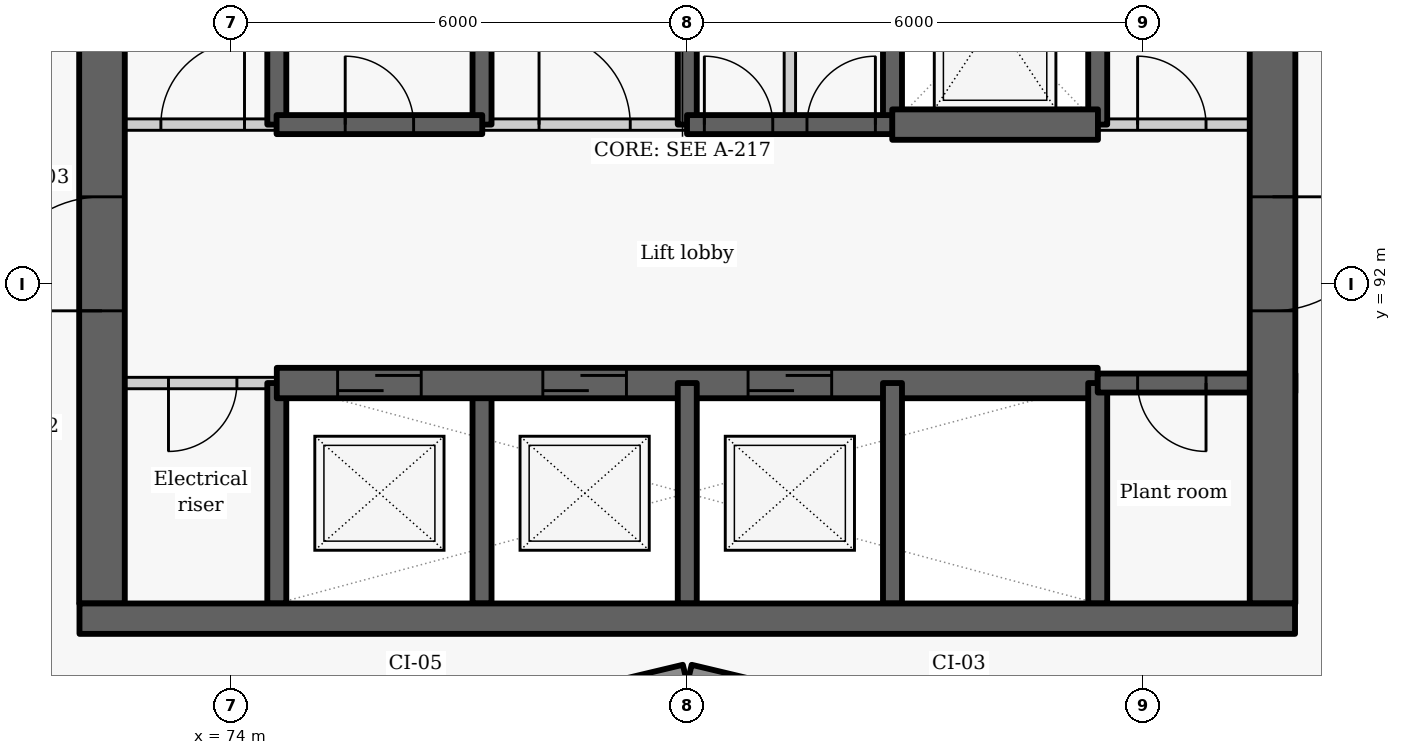
"""IFC4 building model, lengths in metres.
Left out: names, types, materials, properties, quantities, classifications, styles, units other than length and angle.
Written with IfcOpenShell. Run it as: python <this file> out.ifc"""

import sys

from ifc_helpers import new_model, si_unit, direction, frame, frame_2d, origin, place, context, subcontext, project, spatial, rectangle, extrude, element, fill, save


model = new_model("IFC4")
c1 = context("Model", 3, precision=1e-05, world=origin(), true_north=direction((0.0, 1.0)))
c2 = subcontext(c1, "Body", "Model", "MODEL_VIEW")
j1 = project(units=[si_unit("LENGTHUNIT", "METRE"), si_unit("PLANEANGLEUNIT", "RADIAN")], contexts=[c1])
p1 = place(None, origin())
s1 = spatial("IfcSite", under=j1, at=p1, CompositionType="ELEMENT")
p2 = place(p1, origin())
s2 = spatial("IfcBuilding", under=s1, at=p2, CompositionType="ELEMENT")
p3 = place(p2, frame((0.0, 0.0, 81.0)))
s3 = spatial("IfcBuildingStorey", under=s2, at=p3, CompositionType="ELEMENT", Elevation=81.0)
for number, where, z_axis, x_axis in (
    (1, (76.814, 86.119, 0.0), (0.0, 0.0, 1.0), (0.973, 0.232, 0.0)),
    (2, (80.029, 86.872, 0.0), (0.0, 0.0, 1.0), (0.973, -0.232, 0.0)),
):
    element("IfcWall", number, at=place(p3, frame(where, z_axis=z_axis, x_axis=x_axis)), inside=s3, PredefinedType="SOLIDWALL", context=c2, shape_type="SweptSolid", body=[
        extrude(rectangle(XDim=3.246, YDim=0.25, at=frame_2d((1.623, 0.0))), origin(), (0.0, 0.0, 1.0), 2.425),
    ])
p4 = place(p3, frame((74.6, 87.8, -0.275), z_axis=(0.0, 0.0, 1.0), x_axis=(0.0, 1.0, 0.0)))
e3 = element("IfcWall", 3, at=p4, inside=s3, PredefinedType="SHEAR", context=c2, shape_type="SweptSolid", body=[
    extrude(rectangle(XDim=2.9, YDim=0.25, at=frame_2d((1.45, 0.0))), origin(), (0.0, 0.0, 1.0), 3.3),
])
p5 = place(p3, frame((74.6, 94.1, -0.275), z_axis=(0.0, 0.0, 1.0), x_axis=(0.0, 1.0, 0.0)))
e4 = element("IfcWall", 4, at=p5, inside=s3, PredefinedType="SHEAR", context=c2, shape_type="SweptSolid", body=[
    extrude(rectangle(XDim=2.8, YDim=0.25, at=frame_2d((1.4, 0.0))), origin(), (0.0, 0.0, 1.0), 3.3),
])
p6 = place(p3, frame((74.6, 90.7, 0.0), z_axis=(0.0, 0.0, 1.0), x_axis=(-1.0, 0.0, 0.0)))
e5 = element("IfcWall", 5, at=p6, inside=s3, PredefinedType="PARTITIONING", context=c2, shape_type="SweptSolid", body=[
    extrude(rectangle(XDim=2.6, YDim=0.15, at=frame_2d((1.3, 0.0))), origin(), (0.0, 0.0, 1.0), 3.025),
])
p7 = place(p6, frame((0.525, 0.0, 0.0)))
e6 = element("IfcOpeningElement", 6, at=p7, cuts=e5, PredefinedType="OPENING", context=c2, shape_type="SweptSolid", body=[
    extrude(rectangle(XDim=0.9, YDim=2.1, at=frame_2d((0.45, 1.05))), frame((0.0, 0.085, 0.0), z_axis=(0.0, -1.0, 0.0), x_axis=(1.0, 0.0, 0.0)), (0.0, 0.0, 1.0), 0.17),
])
p8 = place(p3, frame((72.3, 87.8, -0.275), z_axis=(0.0, 0.0, 1.0), x_axis=(0.0, 1.0, 0.0)))
e7 = element("IfcWall", 7, at=p8, inside=s3, PredefinedType="SHEAR", context=c2, shape_type="SweptSolid", body=[
    extrude(rectangle(XDim=9.1, YDim=0.6, at=frame_2d((4.55, 0.0))), origin(), (0.0, 0.0, 1.0), 3.3),
])
p9 = place(p8, frame((3.85, 0.0, 0.275)))
e8 = element("IfcOpeningElement", 8, at=p9, cuts=e7, PredefinedType="OPENING", context=c2, shape_type="SweptSolid", body=[
    extrude(rectangle(XDim=1.5, YDim=2.1, at=frame_2d((0.75, 1.05))), frame((0.0, 0.31, 0.0), z_axis=(0.0, -1.0, 0.0), x_axis=(1.0, 0.0, 0.0)), (0.0, 0.0, 1.0), 0.62),
])
p10 = place(p3, frame((77.3, 87.8, -0.275), z_axis=(0.0, 0.0, 1.0), x_axis=(0.0, 1.0, 0.0)))
e9 = element("IfcWall", 9, at=p10, inside=s3, PredefinedType="SHEAR", context=c2, shape_type="SweptSolid", body=[
    extrude(rectangle(XDim=2.9, YDim=0.25, at=frame_2d((1.45, 0.0))), origin(), (0.0, 0.0, 1.0), 3.3),
])
p11 = place(p3, frame((77.3, 94.1, -0.275), z_axis=(0.0, 0.0, 1.0), x_axis=(0.0, 1.0, 0.0)))
e10 = element("IfcWall", 10, at=p11, inside=s3, PredefinedType="SHEAR", context=c2, shape_type="SweptSolid", body=[
    extrude(rectangle(XDim=2.8, YDim=0.25, at=frame_2d((1.4, 0.0))), origin(), (0.0, 0.0, 1.0), 3.3),
])
p12 = place(p3, frame((74.6, 90.7, -0.275), z_axis=(0.0, 0.0, 1.0), x_axis=(1.0, 0.0, 0.0)))
e11 = element("IfcWall", 11, at=p12, inside=s3, PredefinedType="SHEAR", context=c2, shape_type="SweptSolid", body=[
    extrude(rectangle(XDim=10.8, YDim=0.4, at=frame_2d((5.4, 0.0))), origin(), (0.0, 0.0, 1.0), 3.3),
])
p13 = place(p12, frame((0.8, 0.0, 0.275)))
e12 = element("IfcOpeningElement", 12, at=p13, cuts=e11, PredefinedType="OPENING", context=c2, shape_type="SweptSolid", body=[
    extrude(rectangle(XDim=1.1, YDim=2.1, at=frame_2d((0.55, 1.05))), frame((0.0, 0.21, 0.0), z_axis=(0.0, -1.0, 0.0), x_axis=(1.0, 0.0, 0.0)), (0.0, 0.0, 1.0), 0.42),
])
p14 = place(p12, frame((3.5, 0.0, 0.275)))
e13 = element("IfcOpeningElement", 13, at=p14, cuts=e11, PredefinedType="OPENING", context=c2, shape_type="SweptSolid", body=[
    extrude(rectangle(XDim=1.1, YDim=2.1, at=frame_2d((0.55, 1.05))), frame((0.0, 0.21, 0.0), z_axis=(0.0, -1.0, 0.0), x_axis=(1.0, 0.0, 0.0)), (0.0, 0.0, 1.0), 0.42),
])
p15 = place(p12, frame((6.2, 0.0, 0.275)))
e14 = element("IfcOpeningElement", 14, at=p15, cuts=e11, PredefinedType="OPENING", context=c2, shape_type="SweptSolid", body=[
    extrude(rectangle(XDim=1.1, YDim=2.1, at=frame_2d((0.55, 1.05))), frame((0.0, 0.21, 0.0), z_axis=(0.0, -1.0, 0.0), x_axis=(1.0, 0.0, 0.0)), (0.0, 0.0, 1.0), 0.42),
])
p16 = place(p3, frame((80.0, 87.8, -0.275), z_axis=(0.0, 0.0, 1.0), x_axis=(0.0, 1.0, 0.0)))
e15 = element("IfcWall", 15, at=p16, inside=s3, PredefinedType="SHEAR", context=c2, shape_type="SweptSolid", body=[
    extrude(rectangle(XDim=2.9, YDim=0.25, at=frame_2d((1.45, 0.0))), origin(), (0.0, 0.0, 1.0), 3.3),
])
p17 = place(p3, frame((80.0, 94.1, -0.275), z_axis=(0.0, 0.0, 1.0), x_axis=(0.0, 1.0, 0.0)))
e16 = element("IfcWall", 16, at=p17, inside=s3, PredefinedType="SHEAR", context=c2, shape_type="SweptSolid", body=[
    extrude(rectangle(XDim=2.8, YDim=0.25, at=frame_2d((1.4, 0.0))), origin(), (0.0, 0.0, 1.0), 3.3),
])
p18 = place(p3, frame((82.7, 87.8, -0.275), z_axis=(0.0, 0.0, 1.0), x_axis=(0.0, 1.0, 0.0)))
e17 = element("IfcWall", 17, at=p18, inside=s3, PredefinedType="SHEAR", context=c2, shape_type="SweptSolid", body=[
    extrude(rectangle(XDim=2.9, YDim=0.25, at=frame_2d((1.45, 0.0))), origin(), (0.0, 0.0, 1.0), 3.3),
])
p19 = place(p3, frame((82.7, 94.1, -0.275), z_axis=(0.0, 0.0, 1.0), x_axis=(0.0, 1.0, 0.0)))
e18 = element("IfcWall", 18, at=p19, inside=s3, PredefinedType="SHEAR", context=c2, shape_type="SweptSolid", body=[
    extrude(rectangle(XDim=2.8, YDim=0.25, at=frame_2d((1.4, 0.0))), origin(), (0.0, 0.0, 1.0), 3.3),
])
p20 = place(p3, frame((85.4, 87.8, -0.275), z_axis=(0.0, 0.0, 1.0), x_axis=(0.0, 1.0, 0.0)))
e19 = element("IfcWall", 19, at=p20, inside=s3, PredefinedType="SHEAR", context=c2, shape_type="SweptSolid", body=[
    extrude(rectangle(XDim=2.9, YDim=0.25, at=frame_2d((1.45, 0.0))), origin(), (0.0, 0.0, 1.0), 3.3),
])
p21 = place(p3, frame((85.4, 94.1, -0.275), z_axis=(0.0, 0.0, 1.0), x_axis=(0.0, 1.0, 0.0)))
e20 = element("IfcWall", 20, at=p21, inside=s3, PredefinedType="SHEAR", context=c2, shape_type="SweptSolid", body=[
    extrude(rectangle(XDim=2.8, YDim=0.25, at=frame_2d((1.4, 0.0))), origin(), (0.0, 0.0, 1.0), 3.3),
])
p22 = place(p3, frame((88.0, 90.7, -0.275), z_axis=(0.0, 0.0, 1.0), x_axis=(-1.0, 0.0, 0.0)))
e21 = element("IfcWall", 21, at=p22, inside=s3, PredefinedType="SHEAR", context=c2, shape_type="SweptSolid", body=[
    extrude(rectangle(XDim=2.6, YDim=0.25, at=frame_2d((1.3, 0.0))), origin(), (0.0, 0.0, 1.0), 3.3),
])
p23 = place(p22, frame((1.175, 0.0, 0.275)))
e22 = element("IfcOpeningElement", 22, at=p23, cuts=e21, PredefinedType="OPENING", context=c2, shape_type="SweptSolid", body=[
    extrude(rectangle(XDim=0.9, YDim=2.1, at=frame_2d((0.45, 1.05))), frame((0.0, 0.135, 0.0), z_axis=(0.0, -1.0, 0.0), x_axis=(1.0, 0.0, 0.0)), (0.0, 0.0, 1.0), 0.27),
])
p24 = place(p3, frame((87.7, 103.4, -0.275), z_axis=(0.0, 0.0, 1.0), x_axis=(0.0, -1.0, 0.0)))
e23 = element("IfcWall", 23, at=p24, inside=s3, PredefinedType="SHEAR", context=c2, shape_type="SweptSolid", body=[
    extrude(rectangle(XDim=15.6, YDim=0.6, at=frame_2d((7.8, 0.0))), origin(), (0.0, 0.0, 1.0), 3.3),
])
p25 = place(p24, frame((10.25, 0.0, 0.275)))
e24 = element("IfcOpeningElement", 24, at=p25, cuts=e23, PredefinedType="OPENING", context=c2, shape_type="SweptSolid", body=[
    extrude(rectangle(XDim=1.5, YDim=2.1, at=frame_2d((0.75, 1.05))), frame((0.0, 0.31, 0.0), z_axis=(0.0, -1.0, 0.0), x_axis=(1.0, 0.0, 0.0)), (0.0, 0.0, 1.0), 0.62),
])
p26 = place(p24, frame((2.7, 0.0, 0.275)))
e25 = element("IfcOpeningElement", 25, at=p26, cuts=e23, PredefinedType="OPENING", context=c2, shape_type="SweptSolid", body=[
    extrude(rectangle(XDim=1.1, YDim=2.1, at=frame_2d((0.55, 1.05))), frame((0.0, 0.31, 0.0), z_axis=(0.0, -1.0, 0.0), x_axis=(1.0, 0.0, 0.0)), (0.0, 0.0, 1.0), 0.62),
])
p27 = place(p3, frame((72.0, 94.1, 0.0), z_axis=(0.0, 0.0, 1.0), x_axis=(1.0, 0.0, 0.0)))
e26 = element("IfcWall", 26, at=p27, inside=s3, PredefinedType="PARTITIONING", context=c2, shape_type="SweptSolid", body=[
    extrude(rectangle(XDim=2.603, YDim=0.15, at=frame_2d((1.302, 0.0))), origin(), (0.0, 0.0, 1.0), 3.025),
])
p28 = place(p27, frame((1.075, 0.0, 0.0)))
e27 = element("IfcOpeningElement", 27, at=p28, cuts=e26, PredefinedType="OPENING", context=c2, shape_type="SweptSolid", body=[
    extrude(rectangle(XDim=1.1, YDim=2.1, at=frame_2d((0.55, 1.05))), frame((0.0, 0.085, 0.0), z_axis=(0.0, -1.0, 0.0), x_axis=(1.0, 0.0, 0.0)), (0.0, 0.0, 1.0), 0.17),
])
p29 = place(p3, frame((77.297, 94.1, 0.0), z_axis=(0.0, 0.0, 1.0), x_axis=(1.0, 0.0, 0.0)))
e28 = element("IfcWall", 28, at=p29, inside=s3, PredefinedType="PARTITIONING", context=c2, shape_type="SweptSolid", body=[
    extrude(rectangle(XDim=2.706, YDim=0.15, at=frame_2d((1.353, 0.0))), origin(), (0.0, 0.0, 1.0), 3.025),
])
p30 = place(p29, frame((0.753, 0.0, 0.0)))
e29 = element("IfcOpeningElement", 29, at=p30, cuts=e28, PredefinedType="OPENING", context=c2, shape_type="SweptSolid", body=[
    extrude(rectangle(XDim=1.2, YDim=2.1, at=frame_2d((0.6, 1.05))), frame((0.0, 0.085, 0.0), z_axis=(0.0, -1.0, 0.0), x_axis=(1.0, 0.0, 0.0)), (0.0, 0.0, 1.0), 0.17),
])
p31 = place(p3, frame((85.397, 94.1, 0.0), z_axis=(0.0, 0.0, 1.0), x_axis=(1.0, 0.0, 0.0)))
e30 = element("IfcWall", 30, at=p31, inside=s3, PredefinedType="PARTITIONING", context=c2, shape_type="SweptSolid", body=[
    extrude(rectangle(XDim=2.603, YDim=0.15, at=frame_2d((1.302, 0.0))), origin(), (0.0, 0.0, 1.0), 3.025),
])
p32 = place(p31, frame((0.528, 0.0, 0.0)))
e31 = element("IfcOpeningElement", 31, at=p32, cuts=e30, PredefinedType="OPENING", context=c2, shape_type="SweptSolid", body=[
    extrude(rectangle(XDim=0.9, YDim=2.1, at=frame_2d((0.45, 1.05))), frame((0.0, 0.085, 0.0), z_axis=(0.0, -1.0, 0.0), x_axis=(1.0, 0.0, 0.0)), (0.0, 0.0, 1.0), 0.17),
])
p33 = place(p3, frame((74.597, 94.1, -0.275), z_axis=(0.0, 0.0, 1.0), x_axis=(1.0, 0.0, 0.0)))
e32 = element("IfcWall", 32, at=p33, inside=s3, PredefinedType="SHEAR", context=c2, shape_type="SweptSolid", body=[
    extrude(rectangle(XDim=2.706, YDim=0.25, at=frame_2d((1.353, 0.0))), origin(), (0.0, 0.0, 1.0), 3.3),
])
p34 = place(p33, frame((0.903, 0.0, 0.275)))
e33 = element("IfcOpeningElement", 33, at=p34, cuts=e32, PredefinedType="OPENING", context=c2, shape_type="SweptSolid", body=[
    extrude(rectangle(XDim=0.9, YDim=2.1, at=frame_2d((0.45, 1.05))), frame((0.0, 0.135, 0.0), z_axis=(0.0, -1.0, 0.0), x_axis=(1.0, 0.0, 0.0)), (0.0, 0.0, 1.0), 0.27),
])
p35 = place(p3, frame((79.997, 94.1, -0.275), z_axis=(0.0, 0.0, 1.0), x_axis=(1.0, 0.0, 0.0)))
e34 = element("IfcWall", 34, at=p35, inside=s3, PredefinedType="SHEAR", context=c2, shape_type="SweptSolid", body=[
    extrude(rectangle(XDim=2.706, YDim=0.25, at=frame_2d((1.353, 0.0))), origin(), (0.0, 0.0, 1.0), 3.3),
])
p36 = place(p35, frame((0.228, 0.0, 0.275)))
e35 = element("IfcOpeningElement", 35, at=p36, cuts=e34, PredefinedType="OPENING", context=c2, shape_type="SweptSolid", body=[
    extrude(rectangle(XDim=0.9, YDim=2.1, at=frame_2d((0.45, 1.05))), frame((0.0, 0.135, 0.0), z_axis=(0.0, -1.0, 0.0), x_axis=(1.0, 0.0, 0.0)), (0.0, 0.0, 1.0), 0.27),
])
p37 = place(p35, frame((1.578, 0.0, 0.275)))
e36 = element("IfcOpeningElement", 36, at=p37, cuts=e34, PredefinedType="OPENING", context=c2, shape_type="SweptSolid", body=[
    extrude(rectangle(XDim=0.9, YDim=2.1, at=frame_2d((0.45, 1.05))), frame((0.0, 0.135, 0.0), z_axis=(0.0, -1.0, 0.0), x_axis=(1.0, 0.0, 0.0)), (0.0, 0.0, 1.0), 0.27),
])
p38 = place(p3, frame((82.697, 94.1, -0.275), z_axis=(0.0, 0.0, 1.0), x_axis=(1.0, 0.0, 0.0)))
e37 = element("IfcWall", 37, at=p38, inside=s3, PredefinedType="SHEAR", context=c2, shape_type="SweptSolid", body=[
    extrude(rectangle(XDim=2.706, YDim=0.4, at=frame_2d((1.353, 0.0))), origin(), (0.0, 0.0, 1.0), 3.3),
])
p39 = place(p3, frame((81.35, 94.1, 0.0), z_axis=(0.0, 0.0, 1.0), x_axis=(0.0, 1.0, 0.0)))
e38 = element("IfcWall", 38, at=p39, inside=s3, PredefinedType="PARTITIONING", context=c2, shape_type="SweptSolid", body=[
    extrude(rectangle(XDim=2.8, YDim=0.15, at=frame_2d((1.4, 0.0))), origin(), (0.0, 0.0, 1.0), 3.025),
])
p40 = place(p3, frame((72.004, 87.6, -0.275), z_axis=(0.0, 0.0, 1.0), x_axis=(1.0, 0.0, 0.0)))
e39 = element("IfcWall", 39, at=p40, inside=s3, PredefinedType="SHEAR", context=c2, shape_type="SweptSolid", body=[
    extrude(rectangle(XDim=15.992, YDim=0.4, at=frame_2d((7.996, 0.0))), origin(), (0.0, 0.0, 1.0), 3.3),
])
p41 = place(p7, origin())
e40 = element("IfcDoor", 40, at=p41, inside=s3, OperationType="SINGLE_SWING_RIGHT", PredefinedType="DOOR", context=c2, shape_type="SweptSolid", body=[
    extrude(rectangle(XDim=0.9, YDim=2.1, at=frame_2d((0.45, 1.05))), frame((0.0, 0.025, 0.0), z_axis=(0.0, -1.0, 0.0), x_axis=(1.0, 0.0, 0.0)), (0.0, 0.0, 1.0), 0.05),
])
fill(e6, e40)
p42 = place(p13, origin())
e41 = element("IfcDoor", 41, at=p42, inside=s3, OperationType="SLIDING_TO_LEFT", PredefinedType="DOOR", context=c2, shape_type="SweptSolid", body=[
    extrude(rectangle(XDim=1.1, YDim=2.1, at=frame_2d((0.55, 1.05))), frame((0.0, 0.025, 0.0), z_axis=(0.0, -1.0, 0.0), x_axis=(1.0, 0.0, 0.0)), (0.0, 0.0, 1.0), 0.05),
])
fill(e12, e41)
p43 = place(p14, origin())
e42 = element("IfcDoor", 42, at=p43, inside=s3, OperationType="SLIDING_TO_LEFT", PredefinedType="DOOR", context=c2, shape_type="SweptSolid", body=[
    extrude(rectangle(XDim=1.1, YDim=2.1, at=frame_2d((0.55, 1.05))), frame((0.0, 0.025, 0.0), z_axis=(0.0, -1.0, 0.0), x_axis=(1.0, 0.0, 0.0)), (0.0, 0.0, 1.0), 0.05),
])
fill(e13, e42)
p44 = place(p15, origin())
e43 = element("IfcDoor", 43, at=p44, inside=s3, OperationType="SLIDING_TO_LEFT", PredefinedType="DOOR", context=c2, shape_type="SweptSolid", body=[
    extrude(rectangle(XDim=1.1, YDim=2.1, at=frame_2d((0.55, 1.05))), frame((0.0, 0.025, 0.0), z_axis=(0.0, -1.0, 0.0), x_axis=(1.0, 0.0, 0.0)), (0.0, 0.0, 1.0), 0.05),
])
fill(e14, e43)
p45 = place(p23, origin())
e44 = element("IfcDoor", 44, at=p45, inside=s3, OperationType="SINGLE_SWING_LEFT", PredefinedType="DOOR", context=c2, shape_type="SweptSolid", body=[
    extrude(rectangle(XDim=0.9, YDim=2.1, at=frame_2d((0.45, 1.05))), frame((0.0, 0.025, 0.0), z_axis=(0.0, -1.0, 0.0), x_axis=(1.0, 0.0, 0.0)), (0.0, 0.0, 1.0), 0.05),
])
fill(e22, e44)
p46 = place(p28, origin())
e45 = element("IfcDoor", 45, at=p46, inside=s3, OperationType="SINGLE_SWING_RIGHT", PredefinedType="DOOR", context=c2, shape_type="SweptSolid", body=[
    extrude(rectangle(XDim=1.1, YDim=2.1, at=frame_2d((0.55, 1.05))), frame((0.0, 0.025, 0.0), z_axis=(0.0, -1.0, 0.0), x_axis=(1.0, 0.0, 0.0)), (0.0, 0.0, 1.0), 0.05),
])
fill(e27, e45)
p47 = place(p34, origin())
e46 = element("IfcDoor", 46, at=p47, inside=s3, OperationType="SINGLE_SWING_LEFT", PredefinedType="DOOR", context=c2, shape_type="SweptSolid", body=[
    extrude(rectangle(XDim=0.9, YDim=2.1, at=frame_2d((0.45, 1.05))), frame((0.0, 0.025, 0.0), z_axis=(0.0, -1.0, 0.0), x_axis=(1.0, 0.0, 0.0)), (0.0, 0.0, 1.0), 0.05),
])
fill(e33, e46)
p48 = place(p30, origin())
e47 = element("IfcDoor", 47, at=p48, inside=s3, OperationType="DOUBLE_DOOR_SINGLE_SWING", PredefinedType="DOOR", context=c2, shape_type="SweptSolid", body=[
    extrude(rectangle(XDim=1.2, YDim=2.1, at=frame_2d((0.6, 1.05))), frame((0.0, 0.025, 0.0), z_axis=(0.0, -1.0, 0.0), x_axis=(1.0, 0.0, 0.0)), (0.0, 0.0, 1.0), 0.05),
])
fill(e29, e47)
p49 = place(p36, origin())
e48 = element("IfcDoor", 48, at=p49, inside=s3, OperationType="SINGLE_SWING_LEFT", PredefinedType="DOOR", context=c2, shape_type="SweptSolid", body=[
    extrude(rectangle(XDim=0.9, YDim=2.1, at=frame_2d((0.45, 1.05))), frame((0.0, 0.025, 0.0), z_axis=(0.0, -1.0, 0.0), x_axis=(1.0, 0.0, 0.0)), (0.0, 0.0, 1.0), 0.05),
])
fill(e35, e48)
p50 = place(p37, origin())
e49 = element("IfcDoor", 49, at=p50, inside=s3, OperationType="SINGLE_SWING_RIGHT", PredefinedType="DOOR", context=c2, shape_type="SweptSolid", body=[
    extrude(rectangle(XDim=0.9, YDim=2.1, at=frame_2d((0.45, 1.05))), frame((0.0, 0.025, 0.0), z_axis=(0.0, -1.0, 0.0), x_axis=(1.0, 0.0, 0.0)), (0.0, 0.0, 1.0), 0.05),
])
fill(e36, e49)
p51 = place(p32, origin())
e50 = element("IfcDoor", 50, at=p51, inside=s3, OperationType="SINGLE_SWING_LEFT", PredefinedType="DOOR", context=c2, shape_type="SweptSolid", body=[
    extrude(rectangle(XDim=0.9, YDim=2.1, at=frame_2d((0.45, 1.05))), frame((0.0, 0.025, 0.0), z_axis=(0.0, -1.0, 0.0), x_axis=(1.0, 0.0, 0.0)), (0.0, 0.0, 1.0), 0.05),
])
fill(e31, e50)
p52 = place(p25, origin())
e51 = element("IfcDoor", 51, at=p52, inside=s3, OperationType="DOUBLE_DOOR_SINGLE_SWING", PredefinedType="DOOR", context=c2, shape_type="SweptSolid", body=[
    extrude(rectangle(XDim=1.5, YDim=2.1, at=frame_2d((0.75, 1.05))), frame((0.0, 0.025, 0.0), z_axis=(0.0, -1.0, 0.0), x_axis=(1.0, 0.0, 0.0)), (0.0, 0.0, 1.0), 0.05),
])
fill(e24, e51)
p53 = place(p9, origin())
e52 = element("IfcDoor", 52, at=p53, inside=s3, OperationType="DOUBLE_DOOR_SINGLE_SWING", PredefinedType="DOOR", context=c2, shape_type="SweptSolid", body=[
    extrude(rectangle(XDim=1.5, YDim=2.1, at=frame_2d((0.75, 1.05))), frame((0.0, 0.025, 0.0), z_axis=(0.0, -1.0, 0.0), x_axis=(1.0, 0.0, 0.0)), (0.0, 0.0, 1.0), 0.05),
])
fill(e8, e52)
save(model, sys.argv[1])
